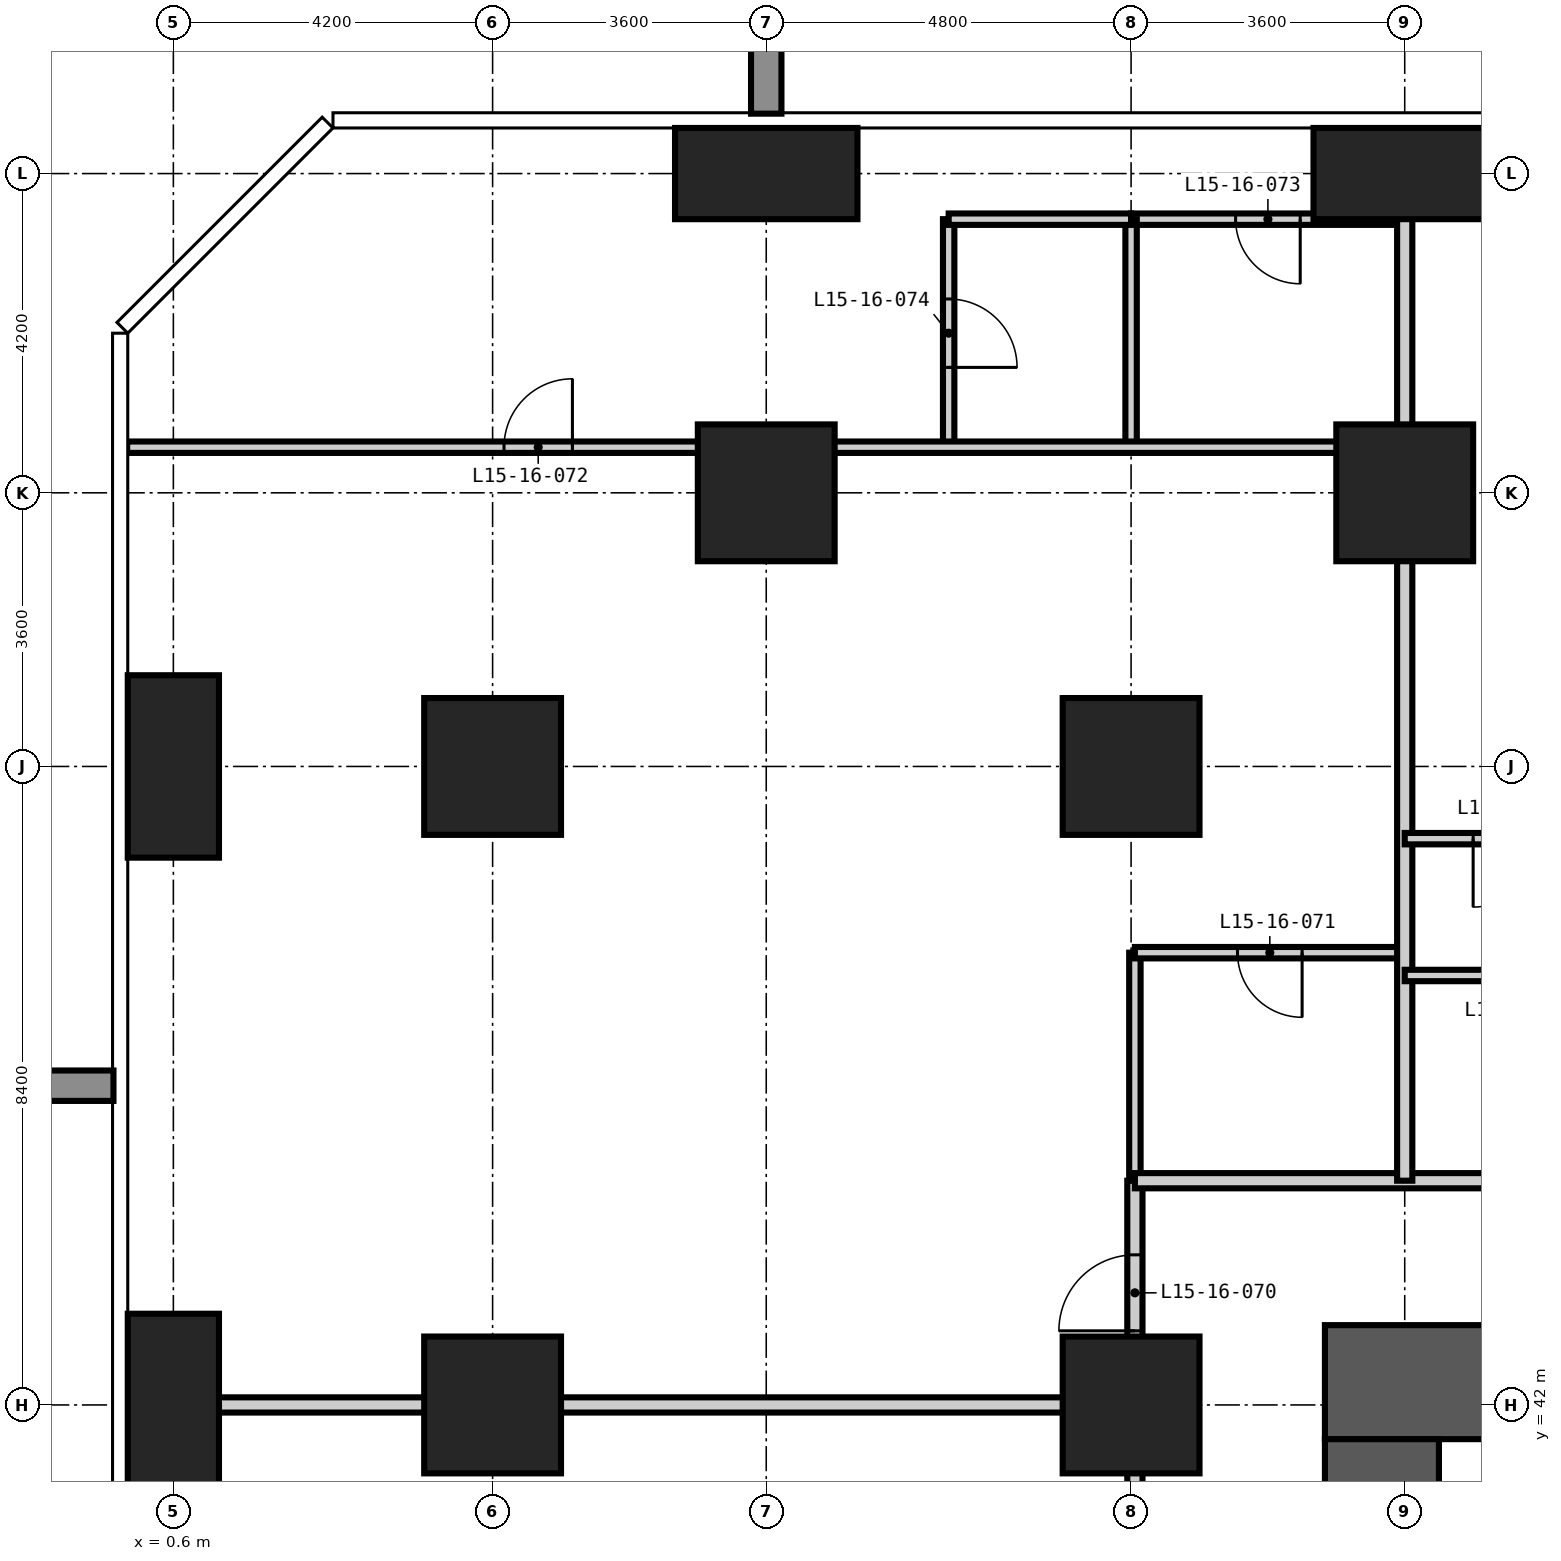
"""IFC4 building model, lengths in metres.
Left out: names, types, materials, properties, quantities, classifications, styles, units other than length and angle.
Written with IfcOpenShell. Run it as: python <this file> out.ifc"""

import sys

from ifc_helpers import new_model, si_unit, direction, frame, frame_2d, origin, origin_2d, place, context, subcontext, project, spatial, rectangle, extrude, element, fill, save


model = new_model("IFC4")
c1 = context("Model", 3, precision=1e-05, world=origin(), true_north=direction((0.0, 1.0)))
c2 = subcontext(c1, "Body", "Model", "MODEL_VIEW")
j1 = project(units=[si_unit("LENGTHUNIT", "METRE"), si_unit("PLANEANGLEUNIT", "RADIAN")], contexts=[c1])
p1 = place(None, origin())
s1 = spatial("IfcSite", under=j1, at=p1, CompositionType="ELEMENT")
p2 = place(p1, origin())
s2 = spatial("IfcBuilding", under=s1, at=p2, CompositionType="ELEMENT")
p3 = place(p2, frame((0.0, 0.0, 63.0)))
s3 = spatial("IfcBuildingStorey", under=s2, at=p3, CompositionType="ELEMENT", Elevation=63.0)
for number, where, z_axis, x_axis in (
    (1, (0.6, 42.0, -0.35), (0.0, 0.0, 1.0), (1.0, 0.0, 0.0)),
    (2, (0.6, 50.4, -0.35), (0.0, 0.0, 1.0), (1.0, 0.0, 0.0)),
):
    element("IfcColumn", number, at=place(p3, frame(where, z_axis=z_axis, x_axis=x_axis)), inside=s3, PredefinedType="COLUMN", context=c2, shape_type="SweptSolid", body=[
        extrude(rectangle(XDim=1.2, YDim=2.4, at=origin_2d()), origin(), (0.0, 0.0, 1.0), 3.6),
    ])
for number, where, z_axis, x_axis in (
    (3, (4.8, 42.0, -0.35), (0.0, 0.0, 1.0), (1.0, 0.0, 0.0)),
    (4, (4.8, 50.4, -0.35), (0.0, 0.0, 1.0), (1.0, 0.0, 0.0)),
    (5, (8.4, 54.0, -0.35), (0.0, 0.0, 1.0), (1.0, 0.0, 0.0)),
):
    element("IfcColumn", number, at=place(p3, frame(where, z_axis=z_axis, x_axis=x_axis)), inside=s3, PredefinedType="COLUMN", context=c2, shape_type="SweptSolid", body=[
        extrude(rectangle(XDim=1.8, YDim=1.8, at=origin_2d()), origin(), (0.0, 0.0, 1.0), 3.6),
    ])
p4 = place(p3, frame((8.4, 58.2, -0.35), z_axis=(0.0, 0.0, 1.0), x_axis=(1.0, 0.0, 0.0)))
e6 = element("IfcColumn", 6, at=p4, inside=s3, PredefinedType="COLUMN", context=c2, shape_type="SweptSolid", body=[
    extrude(rectangle(XDim=2.4, YDim=1.2, at=origin_2d()), origin(), (0.0, 0.0, 1.0), 3.6),
])
for number, where, z_axis, x_axis in (
    (7, (13.2, 42.0, -0.35), (0.0, 0.0, 1.0), (1.0, 0.0, 0.0)),
    (8, (13.2, 50.4, -0.35), (0.0, 0.0, 1.0), (1.0, 0.0, 0.0)),
    (9, (16.8, 54.0, -0.35), (0.0, 0.0, 1.0), (1.0, 0.0, 0.0)),
):
    element("IfcColumn", number, at=place(p3, frame(where, z_axis=z_axis, x_axis=x_axis)), inside=s3, PredefinedType="COLUMN", context=c2, shape_type="SweptSolid", body=[
        extrude(rectangle(XDim=1.8, YDim=1.8, at=origin_2d()), origin(), (0.0, 0.0, 1.0), 3.6),
    ])
p5 = place(p3, frame((16.8, 58.2, -0.35), z_axis=(0.0, 0.0, 1.0), x_axis=(1.0, 0.0, 0.0)))
e10 = element("IfcColumn", 10, at=p5, inside=s3, PredefinedType="COLUMN", context=c2, shape_type="SweptSolid", body=[
    extrude(rectangle(XDim=2.4, YDim=1.2, at=origin_2d()), origin(), (0.0, 0.0, 1.0), 3.6),
])
p6 = place(p3, frame((43.05, 42.3, -0.35), z_axis=(0.0, 0.0, 1.0), x_axis=(-1.0, 0.0, 0.0)))
e11 = element("IfcWall", 11, at=p6, inside=s3, PredefinedType="SHEAR", context=c2, shape_type="SweptSolid", body=[
    extrude(rectangle(XDim=27.3, YDim=1.5, at=frame_2d((13.65, 0.0))), origin(), (0.0, 0.0, 1.0), 3.6),
])
p7 = place(p6, frame((21.55, 0.0, 0.35)))
e12 = element("IfcOpeningElement", 12, at=p7, cuts=e11, PredefinedType="OPENING", context=c2, shape_type="SweptSolid", body=[
    extrude(rectangle(XDim=1.0, YDim=2.1, at=frame_2d((0.5, 1.05))), frame((0.0, 0.76, 0.0), z_axis=(0.0, -1.0, 0.0), x_axis=(1.0, 0.0, 0.0)), (0.0, 0.0, 1.0), 1.52),
])
p8 = place(p6, frame((10.95, 0.0, 0.35)))
e13 = element("IfcOpeningElement", 13, at=p8, cuts=e11, PredefinedType="OPENING", context=c2, shape_type="SweptSolid", body=[
    extrude(rectangle(XDim=1.2, YDim=2.2, at=frame_2d((0.6, 1.1))), frame((0.0, 0.76, 0.0), z_axis=(0.0, -1.0, 0.0), x_axis=(1.0, 0.0, 0.0)), (0.0, 0.0, 1.0), 1.52),
])
p9 = place(p3, frame((16.5, 41.55, -0.35), z_axis=(0.0, 0.0, 1.0), x_axis=(0.0, -1.0, 0.0)))
e14 = element("IfcWall", 14, at=p9, inside=s3, PredefinedType="SHEAR", context=c2, shape_type="SweptSolid", body=[
    extrude(rectangle(XDim=24.3, YDim=1.5, at=frame_2d((12.15, 0.0))), origin(), (0.0, 0.0, 1.0), 3.6),
])
p10 = place(p9, frame((11.25, 0.0, 0.35)))
e15 = element("IfcOpeningElement", 15, at=p10, cuts=e14, PredefinedType="OPENING", context=c2, shape_type="SweptSolid", body=[
    extrude(rectangle(XDim=1.8, YDim=2.2, at=frame_2d((0.9, 1.1))), frame((0.0, 0.76, 0.0), z_axis=(0.0, -1.0, 0.0), x_axis=(1.0, 0.0, 0.0)), (0.0, 0.0, 1.0), 1.52),
])
p11 = place(p9, frame((20.05, 0.0, 0.35)))
e16 = element("IfcOpeningElement", 16, at=p11, cuts=e14, PredefinedType="OPENING", context=c2, shape_type="SweptSolid", body=[
    extrude(rectangle(XDim=1.0, YDim=2.1, at=frame_2d((0.5, 1.05))), frame((0.0, 0.76, 0.0), z_axis=(0.0, -1.0, 0.0), x_axis=(1.0, 0.0, 0.0)), (0.0, 0.0, 1.0), 1.52),
])
p12 = place(p9, frame((5.35, 0.0, 0.35)))
e17 = element("IfcOpeningElement", 17, at=p12, cuts=e14, PredefinedType="OPENING", context=c2, shape_type="SweptSolid", body=[
    extrude(rectangle(XDim=1.0, YDim=2.1, at=frame_2d((0.5, 1.05))), frame((0.0, 0.76, 0.0), z_axis=(0.0, -1.0, 0.0), x_axis=(1.0, 0.0, 0.0)), (0.0, 0.0, 1.0), 1.52),
])
p13 = place(p3, frame((13.25, 44.95, 0.0), z_axis=(0.0, 0.0, 1.0), x_axis=(0.0, 1.0, 0.0)))
e18 = element("IfcWall", 18, at=p13, inside=s3, PredefinedType="PARTITIONING", context=c2, shape_type="SweptSolid", body=[
    extrude(rectangle(XDim=3.0, YDim=0.15, at=frame_2d((1.5, 0.0))), origin(), (0.0, 0.0, 1.0), 3.25),
])
p14 = place(p3, frame((13.25, 47.95, 0.0), z_axis=(0.0, 0.0, 1.0), x_axis=(1.0, 0.0, 0.0)))
e19 = element("IfcWall", 19, at=p14, inside=s3, PredefinedType="PARTITIONING", context=c2, shape_type="SweptSolid", body=[
    extrude(rectangle(XDim=3.55, YDim=0.15, at=frame_2d((1.775, 0.0))), origin(), (0.0, 0.0, 1.0), 3.25),
])
p15 = place(p14, frame((1.35, 0.0, 0.0)))
e20 = element("IfcOpeningElement", 20, at=p15, cuts=e19, PredefinedType="OPENING", context=c2, shape_type="SweptSolid", body=[
    extrude(rectangle(XDim=0.85, YDim=2.1, at=frame_2d((0.425, 1.05))), frame((0.0, 0.085, 0.0), z_axis=(0.0, -1.0, 0.0), x_axis=(1.0, 0.0, 0.0)), (0.0, 0.0, 1.0), 0.17),
])
p16 = place(p3, frame((13.2, 57.6, 0.0), z_axis=(0.0, 0.0, 1.0), x_axis=(1.0, 0.0, 0.0)))
e21 = element("IfcWall", 21, at=p16, inside=s3, PredefinedType="PARTITIONING", context=c2, shape_type="SweptSolid", body=[
    extrude(rectangle(XDim=3.6, YDim=0.15, at=frame_2d((1.8, 0.0))), origin(), (0.0, 0.0, 1.0), 3.25),
])
p17 = place(p16, frame((1.375, 0.0, 0.0)))
e22 = element("IfcOpeningElement", 22, at=p17, cuts=e21, PredefinedType="OPENING", context=c2, shape_type="SweptSolid", body=[
    extrude(rectangle(XDim=0.85, YDim=2.1, at=frame_2d((0.425, 1.05))), frame((0.0, 0.085, 0.0), z_axis=(0.0, -1.0, 0.0), x_axis=(1.0, 0.0, 0.0)), (0.0, 0.0, 1.0), 0.17),
])
p18 = place(p3, frame((13.25, 13.25, 0.0), z_axis=(0.0, 0.0, 1.0), x_axis=(0.0, 1.0, 0.0)))
e23 = element("IfcWall", 23, at=p18, inside=s3, PredefinedType="PARTITIONING", context=c2, shape_type="SweptSolid", body=[
    extrude(rectangle(XDim=31.7, YDim=0.2, at=frame_2d((15.85, 0.0))), origin(), (0.0, 0.0, 1.0), 3.25),
])
p19 = place(p18, frame((7.25, 0.0, 0.0)))
e24 = element("IfcOpeningElement", 24, at=p19, cuts=e23, PredefinedType="OPENING", context=c2, shape_type="SweptSolid", body=[
    extrude(rectangle(XDim=1.0, YDim=2.2, at=frame_2d((0.5, 1.1))), frame((0.0, 0.11, 0.0), z_axis=(0.0, -1.0, 0.0), x_axis=(1.0, 0.0, 0.0)), (0.0, 0.0, 1.0), 0.22),
])
p20 = place(p18, frame((15.65, 0.0, 0.0)))
e25 = element("IfcOpeningElement", 25, at=p20, cuts=e23, PredefinedType="OPENING", context=c2, shape_type="SweptSolid", body=[
    extrude(rectangle(XDim=1.0, YDim=2.2, at=frame_2d((0.5, 1.1))), frame((0.0, 0.11, 0.0), z_axis=(0.0, -1.0, 0.0), x_axis=(1.0, 0.0, 0.0)), (0.0, 0.0, 1.0), 0.22),
])
p21 = place(p18, frame((24.05, 0.0, 0.0)))
e26 = element("IfcOpeningElement", 26, at=p21, cuts=e23, PredefinedType="OPENING", context=c2, shape_type="SweptSolid", body=[
    extrude(rectangle(XDim=1.0, YDim=2.2, at=frame_2d((0.5, 1.1))), frame((0.0, 0.11, 0.0), z_axis=(0.0, -1.0, 0.0), x_axis=(1.0, 0.0, 0.0)), (0.0, 0.0, 1.0), 0.22),
])
p22 = place(p18, frame((1.275, 0.0, 0.0)))
e27 = element("IfcOpeningElement", 27, at=p22, cuts=e23, PredefinedType="OPENING", context=c2, shape_type="SweptSolid", body=[
    extrude(rectangle(XDim=1.0, YDim=2.2, at=frame_2d((0.5, 1.1))), frame((0.0, 0.11, 0.0), z_axis=(0.0, -1.0, 0.0), x_axis=(1.0, 0.0, 0.0)), (0.0, 0.0, 1.0), 0.22),
])
p23 = place(p18, frame((29.725, 0.0, 0.0)))
e28 = element("IfcOpeningElement", 28, at=p23, cuts=e23, PredefinedType="OPENING", context=c2, shape_type="SweptSolid", body=[
    extrude(rectangle(XDim=1.0, YDim=2.2, at=frame_2d((0.5, 1.1))), frame((0.0, 0.11, 0.0), z_axis=(0.0, -1.0, 0.0), x_axis=(1.0, 0.0, 0.0)), (0.0, 0.0, 1.0), 0.22),
])
p24 = place(p3, frame((13.25, 44.95, 0.0), z_axis=(0.0, 0.0, 1.0), x_axis=(1.0, 0.0, 0.0)))
e29 = element("IfcWall", 29, at=p24, inside=s3, PredefinedType="PARTITIONING", context=c2, shape_type="SweptSolid", body=[
    extrude(rectangle(XDim=32.9, YDim=0.2, at=frame_2d((16.45, 0.0))), origin(), (0.0, 0.0, 1.0), 3.25),
])
p25 = place(p24, frame((6.5, 0.0, 0.0)))
e30 = element("IfcOpeningElement", 30, at=p25, cuts=e29, PredefinedType="OPENING", context=c2, shape_type="SweptSolid", body=[
    extrude(rectangle(XDim=1.0, YDim=2.2, at=frame_2d((0.5, 1.1))), frame((0.0, 0.11, 0.0), z_axis=(0.0, -1.0, 0.0), x_axis=(1.0, 0.0, 0.0)), (0.0, 0.0, 1.0), 0.22),
])
p26 = place(p24, frame((8.0, 0.0, 0.0)))
e31 = element("IfcOpeningElement", 31, at=p26, cuts=e29, PredefinedType="OPENING", context=c2, shape_type="SweptSolid", body=[
    extrude(rectangle(XDim=1.0, YDim=2.2, at=frame_2d((0.5, 1.1))), frame((0.0, 0.11, 0.0), z_axis=(0.0, -1.0, 0.0), x_axis=(1.0, 0.0, 0.0)), (0.0, 0.0, 1.0), 0.22),
])
p27 = place(p24, frame((14.9, 0.0, 0.0)))
e32 = element("IfcOpeningElement", 32, at=p27, cuts=e29, PredefinedType="OPENING", context=c2, shape_type="SweptSolid", body=[
    extrude(rectangle(XDim=1.0, YDim=2.2, at=frame_2d((0.5, 1.1))), frame((0.0, 0.11, 0.0), z_axis=(0.0, -1.0, 0.0), x_axis=(1.0, 0.0, 0.0)), (0.0, 0.0, 1.0), 0.22),
])
p28 = place(p24, frame((16.4, 0.0, 0.0)))
e33 = element("IfcOpeningElement", 33, at=p28, cuts=e29, PredefinedType="OPENING", context=c2, shape_type="SweptSolid", body=[
    extrude(rectangle(XDim=1.0, YDim=2.2, at=frame_2d((0.5, 1.1))), frame((0.0, 0.11, 0.0), z_axis=(0.0, -1.0, 0.0), x_axis=(1.0, 0.0, 0.0)), (0.0, 0.0, 1.0), 0.22),
])
p29 = place(p24, frame((23.3, 0.0, 0.0)))
e34 = element("IfcOpeningElement", 34, at=p29, cuts=e29, PredefinedType="OPENING", context=c2, shape_type="SweptSolid", body=[
    extrude(rectangle(XDim=1.0, YDim=2.2, at=frame_2d((0.5, 1.1))), frame((0.0, 0.11, 0.0), z_axis=(0.0, -1.0, 0.0), x_axis=(1.0, 0.0, 0.0)), (0.0, 0.0, 1.0), 0.22),
])
p30 = place(p24, frame((24.8, 0.0, 0.0)))
e35 = element("IfcOpeningElement", 35, at=p30, cuts=e29, PredefinedType="OPENING", context=c2, shape_type="SweptSolid", body=[
    extrude(rectangle(XDim=1.0, YDim=2.2, at=frame_2d((0.5, 1.1))), frame((0.0, 0.11, 0.0), z_axis=(0.0, -1.0, 0.0), x_axis=(1.0, 0.0, 0.0)), (0.0, 0.0, 1.0), 0.22),
])
p31 = place(p3, frame((16.8, 44.95, 0.0), z_axis=(0.0, 0.0, 1.0), x_axis=(0.0, 1.0, 0.0)))
e36 = element("IfcWall", 36, at=p31, inside=s3, PredefinedType="PARTITIONING", context=c2, shape_type="SweptSolid", body=[
    extrude(rectangle(XDim=13.858, YDim=0.2, at=frame_2d((6.929, 0.0))), origin(), (0.0, 0.0, 1.0), 3.25),
])
p32 = place(p3, frame((-0.008, 42.0, 0.0), z_axis=(0.0, 0.0, 1.0), x_axis=(1.0, 0.0, 0.0)))
e37 = element("IfcWall", 37, at=p32, inside=s3, PredefinedType="PARTITIONING", context=c2, shape_type="SweptSolid", body=[
    extrude(rectangle(XDim=13.258, YDim=0.2, at=frame_2d((6.629, 0.0))), origin(), (0.0, 0.0, 1.0), 3.25),
])
p33 = place(p3, frame((10.8, 54.6, 0.0), z_axis=(0.0, 0.0, 1.0), x_axis=(0.0, 1.0, 0.0)))
e38 = element("IfcWall", 38, at=p33, inside=s3, PredefinedType="PARTITIONING", context=c2, shape_type="SweptSolid", body=[
    extrude(rectangle(XDim=3.0, YDim=0.15, at=frame_2d((1.5, 0.0))), origin(), (0.0, 0.0, 1.0), 3.25),
])
p34 = place(p33, frame((1.05, 0.0, 0.0)))
e39 = element("IfcOpeningElement", 39, at=p34, cuts=e38, PredefinedType="OPENING", context=c2, shape_type="SweptSolid", body=[
    extrude(rectangle(XDim=0.9, YDim=2.1, at=frame_2d((0.45, 1.05))), frame((0.0, 0.085, 0.0), z_axis=(0.0, -1.0, 0.0), x_axis=(1.0, 0.0, 0.0)), (0.0, 0.0, 1.0), 0.17),
])
p35 = place(p3, frame((13.2, 54.6, 0.0), z_axis=(0.0, 0.0, 1.0), x_axis=(0.0, 1.0, 0.0)))
e40 = element("IfcWall", 40, at=p35, inside=s3, PredefinedType="PARTITIONING", context=c2, shape_type="SweptSolid", body=[
    extrude(rectangle(XDim=3.0, YDim=0.15, at=frame_2d((1.5, 0.0))), origin(), (0.0, 0.0, 1.0), 3.25),
])
p36 = place(p3, frame((16.8, 47.65, 0.0), z_axis=(0.0, 0.0, 1.0), x_axis=(1.0, 0.0, 0.0)))
e41 = element("IfcWall", 41, at=p36, inside=s3, PredefinedType="PARTITIONING", context=c2, shape_type="SweptSolid", body=[
    extrude(rectangle(XDim=2.7, YDim=0.15, at=frame_2d((1.35, 0.0))), origin(), (0.0, 0.0, 1.0), 3.25),
])
p37 = place(p3, frame((16.8, 49.45, 0.0), z_axis=(0.0, 0.0, 1.0), x_axis=(1.0, 0.0, 0.0)))
e42 = element("IfcWall", 42, at=p37, inside=s3, PredefinedType="PARTITIONING", context=c2, shape_type="SweptSolid", body=[
    extrude(rectangle(XDim=2.7, YDim=0.15, at=frame_2d((1.35, 0.0))), origin(), (0.0, 0.0, 1.0), 3.25),
])
p38 = place(p37, frame((0.9, 0.0, 0.0)))
e43 = element("IfcOpeningElement", 43, at=p38, cuts=e42, PredefinedType="OPENING", context=c2, shape_type="SweptSolid", body=[
    extrude(rectangle(XDim=0.9, YDim=2.1, at=frame_2d((0.45, 1.05))), frame((0.0, 0.085, 0.0), z_axis=(0.0, -1.0, 0.0), x_axis=(1.0, 0.0, 0.0)), (0.0, 0.0, 1.0), 0.17),
])
p39 = place(p3, frame((-0.008, 54.6, 0.0), z_axis=(0.0, 0.0, 1.0), x_axis=(1.0, 0.0, 0.0)))
e44 = element("IfcWall", 44, at=p39, inside=s3, PredefinedType="PARTITIONING", context=c2, shape_type="SweptSolid", body=[
    extrude(rectangle(XDim=16.808, YDim=0.15, at=frame_2d((8.404, 0.0))), origin(), (0.0, 0.0, 1.0), 3.25),
])
p40 = place(p39, frame((4.958, 0.0, 0.0)))
e45 = element("IfcOpeningElement", 45, at=p40, cuts=e44, PredefinedType="OPENING", context=c2, shape_type="SweptSolid", body=[
    extrude(rectangle(XDim=0.9, YDim=2.1, at=frame_2d((0.45, 1.05))), frame((0.0, 0.085, 0.0), z_axis=(0.0, -1.0, 0.0), x_axis=(1.0, 0.0, 0.0)), (0.0, 0.0, 1.0), 0.17),
])
p41 = place(p3, frame((10.8, 57.6, 0.0), z_axis=(0.0, 0.0, 1.0), x_axis=(1.0, 0.0, 0.0)))
e46 = element("IfcWall", 46, at=p41, inside=s3, PredefinedType="PARTITIONING", context=c2, shape_type="SweptSolid", body=[
    extrude(rectangle(XDim=2.4, YDim=0.15, at=frame_2d((1.2, 0.0))), origin(), (0.0, 0.0, 1.0), 3.25),
])
p42 = place(p38, frame((0.9, 0.0, 0.0), z_axis=(0.0, 0.0, 1.0), x_axis=(-1.0, 0.0, 0.0)))
e47 = element("IfcDoor", 47, at=p42, inside=s3, OperationType="SINGLE_SWING_RIGHT", PredefinedType="DOOR", context=c2, shape_type="SweptSolid", body=[
    extrude(rectangle(XDim=0.9, YDim=2.1, at=frame_2d((0.45, 1.05))), frame((0.0, 0.025, 0.0), z_axis=(0.0, -1.0, 0.0), x_axis=(1.0, 0.0, 0.0)), (0.0, 0.0, 1.0), 0.05),
])
fill(e43, e47)
p43 = place(p23, origin())
e48 = element("IfcDoor", 48, at=p43, inside=s3, OperationType="SINGLE_SWING_LEFT", PredefinedType="DOOR", context=c2, shape_type="SweptSolid", body=[
    extrude(rectangle(XDim=1.0, YDim=2.2, at=frame_2d((0.5, 1.1))), frame((0.0, 0.025, 0.0), z_axis=(0.0, -1.0, 0.0), x_axis=(1.0, 0.0, 0.0)), (0.0, 0.0, 1.0), 0.05),
])
fill(e28, e48)
p44 = place(p15, frame((0.85, 0.0, 0.0), z_axis=(0.0, 0.0, 1.0), x_axis=(-1.0, 0.0, 0.0)))
e49 = element("IfcDoor", 49, at=p44, inside=s3, OperationType="SINGLE_SWING_LEFT", PredefinedType="DOOR", context=c2, shape_type="SweptSolid", body=[
    extrude(rectangle(XDim=0.85, YDim=2.1, at=frame_2d((0.425, 1.05))), frame((0.0, 0.025, 0.0), z_axis=(0.0, -1.0, 0.0), x_axis=(1.0, 0.0, 0.0)), (0.0, 0.0, 1.0), 0.05),
])
fill(e20, e49)
p45 = place(p40, origin())
e50 = element("IfcDoor", 50, at=p45, inside=s3, OperationType="SINGLE_SWING_RIGHT", PredefinedType="DOOR", context=c2, shape_type="SweptSolid", body=[
    extrude(rectangle(XDim=0.9, YDim=2.1, at=frame_2d((0.45, 1.05))), frame((0.0, 0.025, 0.0), z_axis=(0.0, -1.0, 0.0), x_axis=(1.0, 0.0, 0.0)), (0.0, 0.0, 1.0), 0.05),
])
fill(e45, e50)
p46 = place(p17, frame((0.85, 0.0, 0.0), z_axis=(0.0, 0.0, 1.0), x_axis=(-1.0, 0.0, 0.0)))
e51 = element("IfcDoor", 51, at=p46, inside=s3, OperationType="SINGLE_SWING_LEFT", PredefinedType="DOOR", context=c2, shape_type="SweptSolid", body=[
    extrude(rectangle(XDim=0.85, YDim=2.1, at=frame_2d((0.425, 1.05))), frame((0.0, 0.025, 0.0), z_axis=(0.0, -1.0, 0.0), x_axis=(1.0, 0.0, 0.0)), (0.0, 0.0, 1.0), 0.05),
])
fill(e22, e51)
p47 = place(p34, frame((0.9, 0.0, 0.0), z_axis=(0.0, 0.0, 1.0), x_axis=(-1.0, 0.0, 0.0)))
e52 = element("IfcDoor", 52, at=p47, inside=s3, OperationType="SINGLE_SWING_RIGHT", PredefinedType="DOOR", context=c2, shape_type="SweptSolid", body=[
    extrude(rectangle(XDim=0.9, YDim=2.1, at=frame_2d((0.45, 1.05))), frame((0.0, 0.025, 0.0), z_axis=(0.0, -1.0, 0.0), x_axis=(1.0, 0.0, 0.0)), (0.0, 0.0, 1.0), 0.05),
])
fill(e39, e52)
save(model, sys.argv[1])
